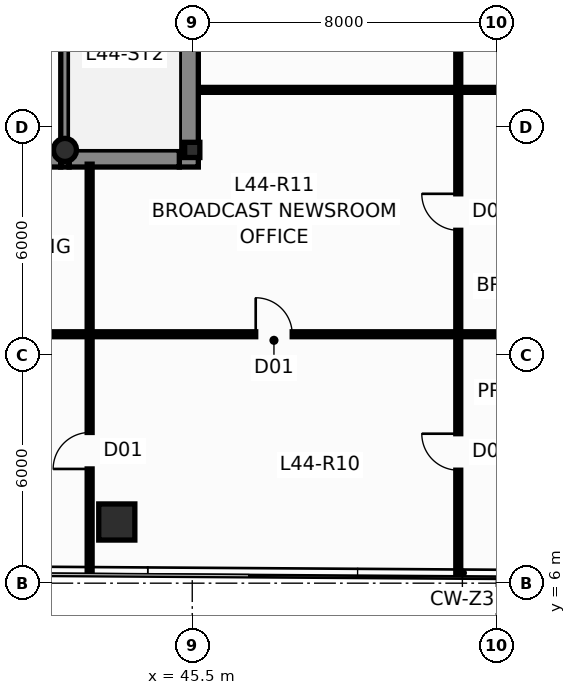
"""IFC4 building model, lengths in metres.
Left out: names, types, materials, properties, quantities, classifications, styles, units other than length and angle.
Written with IfcOpenShell. Run it as: python <this file> out.ifc"""

import sys

from ifc_helpers import new_model, si_unit, direction, frame, frame_2d, origin, origin_2d, place, context, subcontext, project, spatial, rectangle, hollow_rectangle, hollow_circle, i_section, extrude, source, transform, mapped, element, fill, save


model = new_model("IFC4")
c1 = context("Model", 3, precision=1e-05, world=origin(), true_north=direction((0.0, 1.0)))
c2 = subcontext(c1, "Body", "Model", "MODEL_VIEW")
j1 = project(units=[si_unit("LENGTHUNIT", "METRE"), si_unit("PLANEANGLEUNIT", "RADIAN")], contexts=[c1])
p1 = place(None, origin())
s1 = spatial("IfcSite", under=j1, at=p1, CompositionType="ELEMENT")
p2 = place(p1, origin())
s2 = spatial("IfcBuilding", under=s1, at=p2, CompositionType="ELEMENT")
p3 = place(p2, frame((0.0, 0.0, 169.45)))
s3 = spatial("IfcBuildingStorey", under=s2, at=p3, CompositionType="ELEMENT", Elevation=169.45)
m1 = source(origin(), c2, "Body", "SweptSolid", [
    extrude(i_section(OverallWidth=0.4, OverallDepth=0.4, WebThickness=0.02, FlangeThickness=0.032, at=origin_2d()), origin(), (0.0, 0.0, 1.0), 3.65),
])
p4 = place(p3, frame((45.5, 17.4, 0.0), z_axis=(0.0, 0.0, 1.0), x_axis=(1.0, 0.0, 0.0)))
e1 = element("IfcColumn", 1, at=p4, inside=s3, PredefinedType="COLUMN", context=c2, shape_type="MappedRepresentation", body=[
    mapped(m1, transform((0.0, 0.0, 0.0), scale=1.0)),
])
m2 = source(origin(), c2, "Body", "SweptSolid", [
    extrude(hollow_circle(Radius=0.305, WallThickness=0.025, at=origin_2d()), origin(), (0.0, 0.0, 1.0), 3.65),
])
p5 = place(p3, frame((42.15, 17.4, 0.0), z_axis=(0.0, 0.0, 1.0), x_axis=(1.0, 0.0, 0.0)))
e2 = element("IfcColumn", 2, at=p5, inside=s3, PredefinedType="COLUMN", context=c2, shape_type="MappedRepresentation", body=[
    mapped(m2, transform((0.0, 0.0, 0.0), scale=1.0)),
])
p6 = place(p3, frame((45.41, 16.95, 0.0), z_axis=(0.0, 0.0, 1.0), x_axis=(0.0, 1.0, 0.0)))
e3 = element("IfcWall", 3, at=p6, inside=s3, PredefinedType="SHEAR", context=c2, shape_type="SweptSolid", body=[
    extrude(rectangle(XDim=13.275, YDim=0.5, at=frame_2d((6.638, 0.0))), origin(), (0.0, 0.0, 1.0), 3.65),
])
p7 = place(p6, frame((6.4, 0.0, 0.0)))
e4 = element("IfcOpeningElement", 4, at=p7, cuts=e3, PredefinedType="OPENING", context=c2, shape_type="SweptSolid", body=[
    extrude(rectangle(XDim=1.12, YDim=2.15, at=frame_2d((0.56, 1.075))), frame((0.0, 0.262, 0.0), z_axis=(0.0, -1.0, 0.0), x_axis=(1.0, 0.0, 0.0)), (0.0, 0.0, 1.0), 0.524),
])
p8 = place(p6, frame((10.85, 0.0, 0.0)))
e5 = element("IfcOpeningElement", 5, at=p8, cuts=e3, PredefinedType="OPENING", context=c2, shape_type="SweptSolid", body=[
    extrude(rectangle(XDim=1.2, YDim=2.2, at=frame_2d((0.6, 1.1))), frame((0.0, 0.262, 0.0), z_axis=(0.0, -1.0, 0.0), x_axis=(1.0, 0.0, 0.0)), (0.0, 0.0, 1.0), 0.524),
])
p9 = place(p3, frame((33.96, 17.175, 0.0), z_axis=(0.0, 0.0, 1.0), x_axis=(1.0, 0.0, 0.0)))
e6 = element("IfcWall", 6, at=p9, inside=s3, PredefinedType="SHEAR", context=c2, shape_type="SweptSolid", body=[
    extrude(rectangle(XDim=8.08, YDim=0.45, at=frame_2d((4.04, 0.0))), origin(), (0.0, 0.0, 1.0), 3.65),
])
p10 = place(p3, frame((42.26, 17.175, 0.0), z_axis=(0.0, 0.0, 1.0), x_axis=(1.0, 0.0, 0.0)))
e7 = element("IfcWall", 7, at=p10, inside=s3, PredefinedType="SHEAR", context=c2, shape_type="SweptSolid", body=[
    extrude(rectangle(XDim=2.9, YDim=0.45, at=frame_2d((1.45, 0.0))), origin(), (0.0, 0.0, 1.0), 3.65),
])
p11 = place(p3, frame((42.15, 16.95, 0.0), z_axis=(0.0, 0.0, 1.0), x_axis=(0.0, 1.0, 0.0)))
e8 = element("IfcWall", 8, at=p11, inside=s3, PredefinedType="SHEAR", context=c2, shape_type="SweptSolid", body=[
    extrude(rectangle(XDim=13.275, YDim=0.22, at=frame_2d((6.638, 0.0))), origin(), (0.0, 0.0, 1.0), 3.65),
])
m3 = source(origin(), c2, "Body", "SweptSolid", [
    extrude(hollow_rectangle(XDim=0.95, YDim=0.95, WallThickness=0.05, at=origin_2d()), origin(), (0.0, 0.0, 1.0), 3.651),
])
p12 = place(p3, frame((43.514, 7.61, 0.0), z_axis=(0.004480382638, 0.019793929266, 0.999794042058), x_axis=(-0.975326687046, 0.220766513622, 0.0)))
e9 = element("IfcColumn", 9, at=p12, inside=s3, PredefinedType="COLUMN", context=c2, shape_type="MappedRepresentation", body=[
    mapped(m3, transform((0.0, 0.0, 0.0), scale=1.0)),
])
p13 = place(p3, frame((52.505, 12.55, 0.0), z_axis=(0.0, 0.0, 1.0), x_axis=(1.0, 0.0, 0.0)))
e10 = element("IfcWall", 10, at=p13, inside=s3, PredefinedType="PARTITIONING", context=c2, shape_type="SweptSolid", body=[
    extrude(rectangle(XDim=12.117, YDim=0.13, at=frame_2d((6.059, 0.0))), origin(), (0.0, 0.0, 1.0), 3.4),
])
p14 = place(p3, frame((42.805, 12.55, 0.0), z_axis=(0.0, 0.0, 1.0), x_axis=(1.0, 0.0, 0.0)))
e11 = element("IfcWall", 11, at=p14, inside=s3, PredefinedType="PARTITIONING", context=c2, shape_type="SweptSolid", body=[
    extrude(rectangle(XDim=9.69, YDim=0.13, at=frame_2d((4.845, 0.0))), origin(), (0.0, 0.0, 1.0), 3.078),
])
p15 = place(p14, frame((4.365, 0.0, 0.0)))
e12 = element("IfcOpeningElement", 12, at=p15, cuts=e11, PredefinedType="OPENING", context=c2, shape_type="SweptSolid", body=[
    extrude(rectangle(XDim=0.96, YDim=2.15, at=frame_2d((0.48, 1.075))), frame((0.0, 0.077, 0.0), z_axis=(0.0, -1.0, 0.0), x_axis=(1.0, 0.0, 0.0)), (0.0, 0.0, 1.0), 0.154),
])
p16 = place(p3, frame((33.205, 12.55, 0.0), z_axis=(0.0, 0.0, 1.0), x_axis=(1.0, 0.0, 0.0)))
e13 = element("IfcWall", 13, at=p16, inside=s3, PredefinedType="PARTITIONING", context=c2, shape_type="SweptSolid", body=[
    extrude(rectangle(XDim=9.59, YDim=0.13, at=frame_2d((4.795, 0.0))), origin(), (0.0, 0.0, 1.0), 3.078),
])
p17 = place(p16, frame((4.315, 0.0, 0.0)))
e14 = element("IfcOpeningElement", 14, at=p17, cuts=e13, PredefinedType="OPENING", context=c2, shape_type="SweptSolid", body=[
    extrude(rectangle(XDim=0.96, YDim=2.15, at=frame_2d((0.48, 1.075))), frame((0.0, 0.077, 0.0), z_axis=(0.0, -1.0, 0.0), x_axis=(1.0, 0.0, 0.0)), (0.0, 0.0, 1.0), 0.154),
])
p18 = place(p3, frame((52.505, 18.98, 0.0), z_axis=(0.0, 0.0, 1.0), x_axis=(1.0, 0.0, 0.0)))
e15 = element("IfcWall", 15, at=p18, inside=s3, PredefinedType="PARTITIONING", context=c2, shape_type="SweptSolid", body=[
    extrude(rectangle(XDim=8.721, YDim=0.13, at=frame_2d((4.361, 0.0))), origin(), (0.0, 0.0, 1.0), 3.4),
])
p19 = place(p3, frame((45.675, 18.98, 0.0), z_axis=(0.0, 0.0, 1.0), x_axis=(1.0, 0.0, 0.0)))
e16 = element("IfcWall", 16, at=p19, inside=s3, PredefinedType="PARTITIONING", context=c2, shape_type="SweptSolid", body=[
    extrude(rectangle(XDim=6.82, YDim=0.13, at=frame_2d((3.41, 0.0))), origin(), (0.0, 0.0, 1.0), 3.4),
])
p20 = place(p3, frame((52.5, 12.555, 0.0), z_axis=(0.0, 0.0, 1.0), x_axis=(0.0, 1.0, 0.0)))
e17 = element("IfcWall", 17, at=p20, inside=s3, PredefinedType="PARTITIONING", context=c2, shape_type="SweptSolid", body=[
    extrude(rectangle(XDim=6.42, YDim=0.13, at=frame_2d((3.21, 0.0))), origin(), (0.0, 0.0, 1.0), 3.078),
])
p21 = place(p20, frame((2.73, 0.0, 0.0)))
e18 = element("IfcOpeningElement", 18, at=p21, cuts=e17, PredefinedType="OPENING", context=c2, shape_type="SweptSolid", body=[
    extrude(rectangle(XDim=0.96, YDim=2.15, at=frame_2d((0.48, 1.075))), frame((0.0, 0.077, 0.0), z_axis=(0.0, -1.0, 0.0), x_axis=(1.0, 0.0, 0.0)), (0.0, 0.0, 1.0), 0.154),
])
p22 = place(p3, frame((52.5, 18.985, 0.0), z_axis=(0.0, 0.0, 1.0), x_axis=(0.0, 1.0, 0.0)))
e19 = element("IfcWall", 19, at=p22, inside=s3, PredefinedType="PARTITIONING", context=c2, shape_type="SweptSolid", body=[
    extrude(rectangle(XDim=6.42, YDim=0.13, at=frame_2d((3.21, 0.0))), origin(), (0.0, 0.0, 1.0), 3.078),
])
p23 = place(p22, frame((2.73, 0.0, 0.0)))
e20 = element("IfcOpeningElement", 20, at=p23, cuts=e19, PredefinedType="OPENING", context=c2, shape_type="SweptSolid", body=[
    extrude(rectangle(XDim=0.96, YDim=2.15, at=frame_2d((0.48, 1.075))), frame((0.0, 0.077, 0.0), z_axis=(0.0, -1.0, 0.0), x_axis=(1.0, 0.0, 0.0)), (0.0, 0.0, 1.0), 0.154),
])
p24 = place(p3, frame((52.5, 6.265, 0.0), z_axis=(0.0, 0.0, 1.0), x_axis=(0.0, 1.0, 0.0)))
e21 = element("IfcWall", 21, at=p24, inside=s3, PredefinedType="PARTITIONING", context=c2, shape_type="SweptSolid", body=[
    extrude(rectangle(XDim=6.28, YDim=0.13, at=frame_2d((3.14, 0.0))), origin(), (0.0, 0.0, 1.0), 3.4),
])
p25 = place(p24, frame((2.708, 0.0, 0.0)))
e22 = element("IfcOpeningElement", 22, at=p25, cuts=e21, PredefinedType="OPENING", context=c2, shape_type="SweptSolid", body=[
    extrude(rectangle(XDim=0.96, YDim=2.15, at=frame_2d((0.48, 1.075))), frame((0.0, 0.077, 0.0), z_axis=(0.0, -1.0, 0.0), x_axis=(1.0, 0.0, 0.0)), (0.0, 0.0, 1.0), 0.154),
])
p26 = place(p3, frame((42.8, 6.329, 0.0), z_axis=(0.0, 0.0, 1.0), x_axis=(0.0, 1.0, 0.0)))
e23 = element("IfcWall", 23, at=p26, inside=s3, PredefinedType="PARTITIONING", context=c2, shape_type="SweptSolid", body=[
    extrude(rectangle(XDim=6.216, YDim=0.13, at=frame_2d((3.108, 0.0))), origin(), (0.0, 0.0, 1.0), 3.4),
])
p27 = place(p26, frame((2.677, 0.0, 0.0)))
e24 = element("IfcOpeningElement", 24, at=p27, cuts=e23, PredefinedType="OPENING", context=c2, shape_type="SweptSolid", body=[
    extrude(rectangle(XDim=0.96, YDim=2.15, at=frame_2d((0.48, 1.075))), frame((0.0, 0.077, 0.0), z_axis=(0.0, -1.0, 0.0), x_axis=(1.0, 0.0, 0.0)), (0.0, 0.0, 1.0), 0.154),
])
p28 = place(p3, frame((42.8, 12.555, 0.0), z_axis=(0.0, 0.0, 1.0), x_axis=(0.0, 1.0, 0.0)))
e25 = element("IfcWall", 25, at=p28, inside=s3, PredefinedType="PARTITIONING", context=c2, shape_type="SweptSolid", body=[
    extrude(rectangle(XDim=4.47, YDim=0.13, at=frame_2d((2.235, 0.0))), origin(), (0.0, 0.0, 1.0), 3.4),
])
p29 = place(p15, origin())
e26 = element("IfcDoor", 26, at=p29, inside=s3, OperationType="SINGLE_SWING_LEFT", PredefinedType="DOOR", context=c2, shape_type="SweptSolid", body=[
    extrude(rectangle(XDim=0.96, YDim=2.15, at=frame_2d((0.48, 1.075))), frame((0.0, 0.025, 0.0), z_axis=(0.0, -1.0, 0.0), x_axis=(1.0, 0.0, 0.0)), (0.0, 0.0, 1.0), 0.05),
])
fill(e12, e26)
p30 = place(p21, origin())
e27 = element("IfcDoor", 27, at=p30, inside=s3, OperationType="SINGLE_SWING_RIGHT", PredefinedType="DOOR", context=c2, shape_type="SweptSolid", body=[
    extrude(rectangle(XDim=0.96, YDim=2.15, at=frame_2d((0.48, 1.075))), frame((0.0, 0.025, 0.0), z_axis=(0.0, -1.0, 0.0), x_axis=(1.0, 0.0, 0.0)), (0.0, 0.0, 1.0), 0.05),
])
fill(e18, e27)
p31 = place(p25, origin())
e28 = element("IfcDoor", 28, at=p31, inside=s3, OperationType="SINGLE_SWING_RIGHT", PredefinedType="DOOR", context=c2, shape_type="SweptSolid", body=[
    extrude(rectangle(XDim=0.96, YDim=2.15, at=frame_2d((0.48, 1.075))), frame((0.0, 0.025, 0.0), z_axis=(0.0, -1.0, 0.0), x_axis=(1.0, 0.0, 0.0)), (0.0, 0.0, 1.0), 0.05),
])
fill(e22, e28)
p32 = place(p27, origin())
e29 = element("IfcDoor", 29, at=p32, inside=s3, OperationType="SINGLE_SWING_LEFT", PredefinedType="DOOR", context=c2, shape_type="SweptSolid", body=[
    extrude(rectangle(XDim=0.96, YDim=2.15, at=frame_2d((0.48, 1.075))), frame((0.0, 0.025, 0.0), z_axis=(0.0, -1.0, 0.0), x_axis=(1.0, 0.0, 0.0)), (0.0, 0.0, 1.0), 0.05),
])
fill(e24, e29)
save(model, sys.argv[1])
